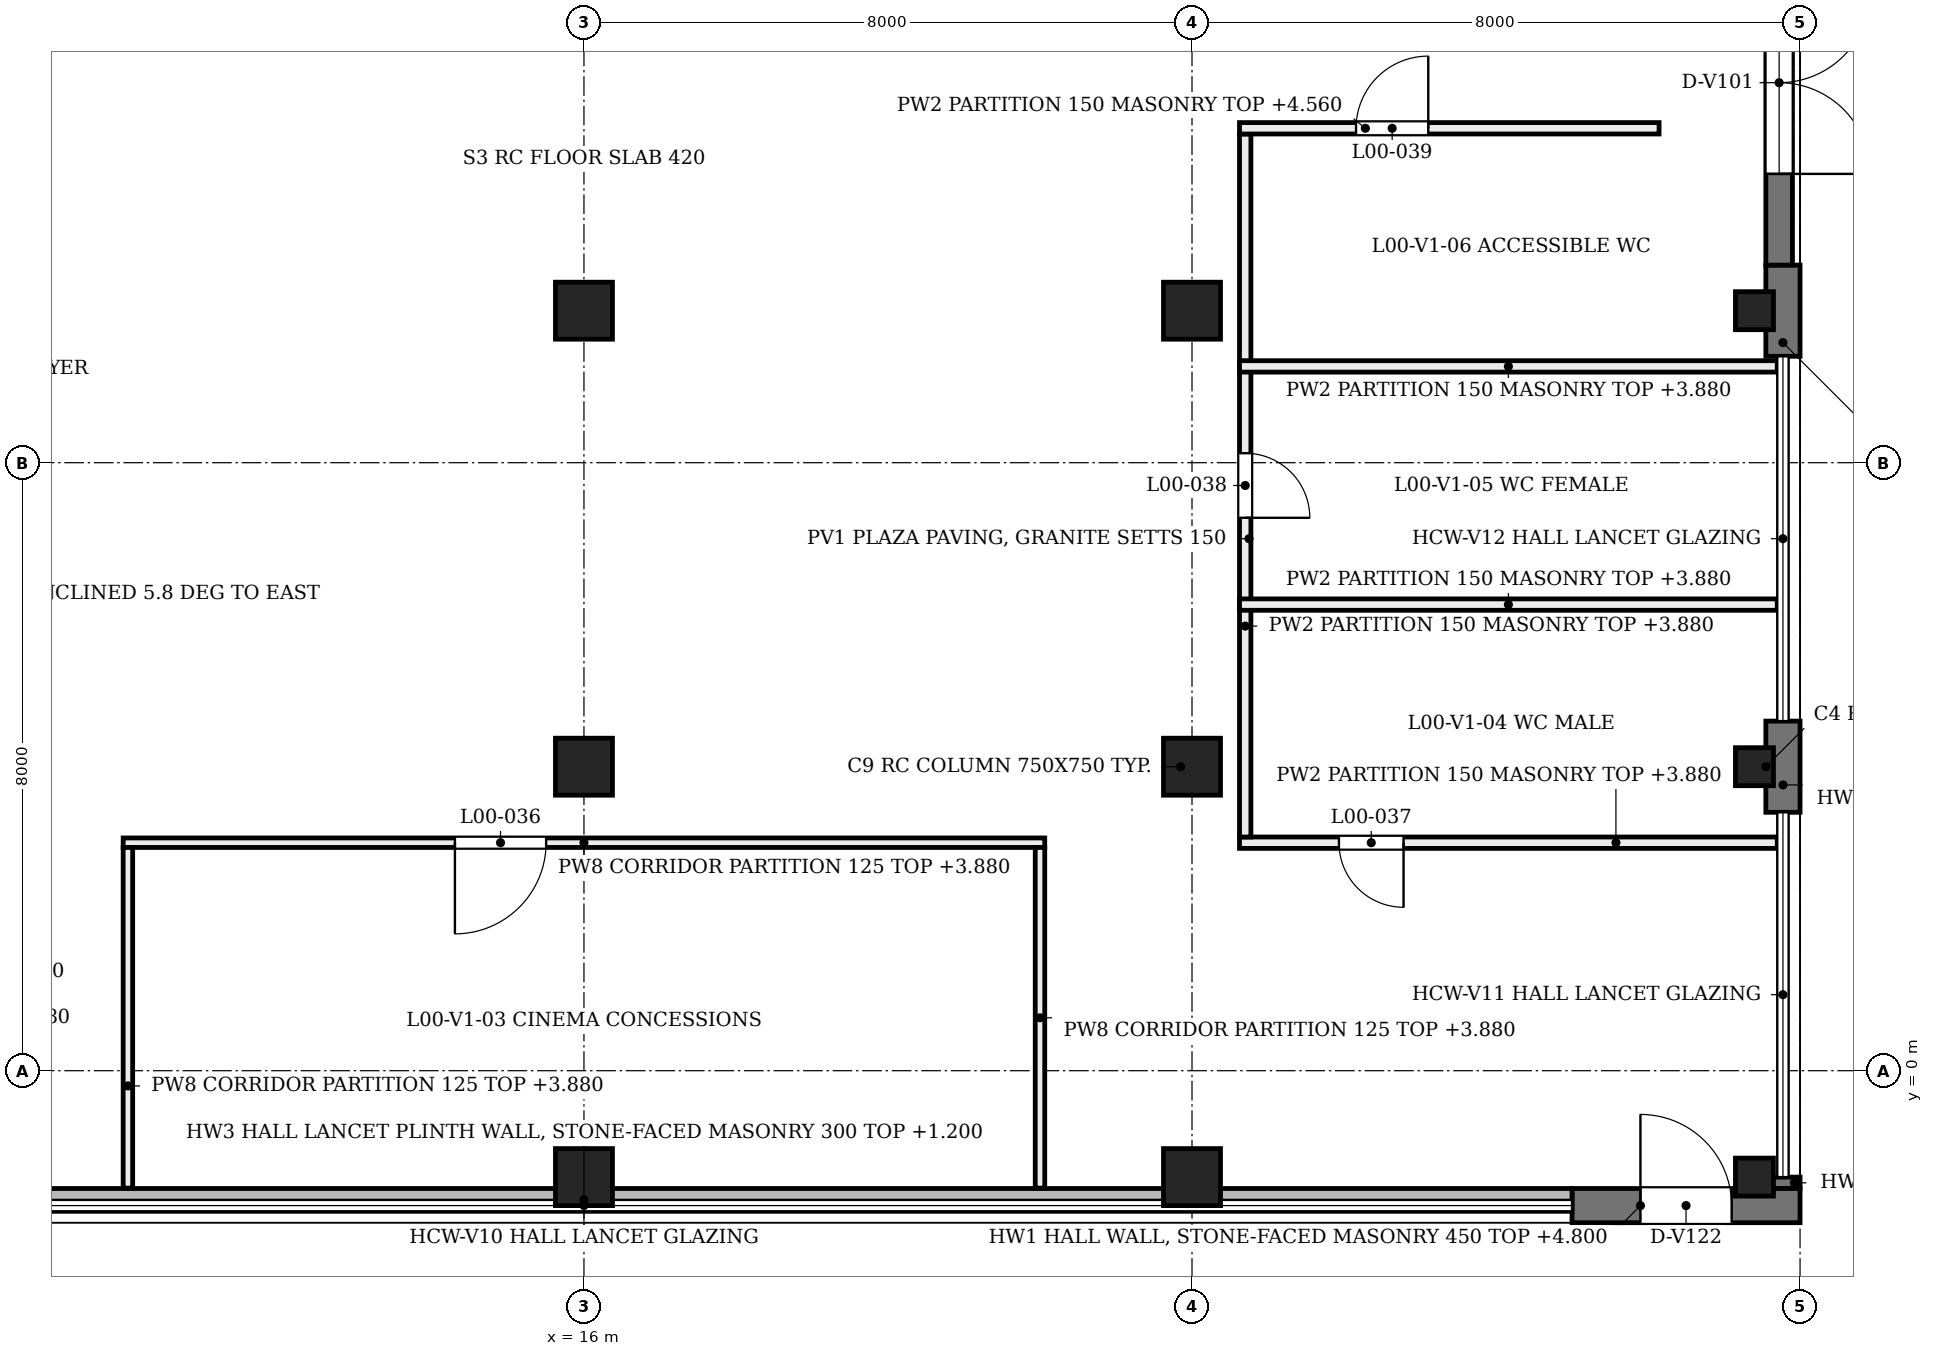
"""IFC4 building model, lengths in metres.
Left out: names, types, materials, properties, quantities, classifications, styles, units other than length and angle.
Written with IfcOpenShell. Run it as: python <this file> out.ifc"""

import sys

from ifc_helpers import new_model, si_unit, direction, frame, frame_2d, origin, origin_2d, place, context, subcontext, project, spatial, rectangle, extrude, element, fill, save


model = new_model("IFC4")
c1 = context("Model", 3, precision=1e-05, world=origin(), true_north=direction((0.0, 1.0)))
c2 = subcontext(c1, "Body", "Model", "MODEL_VIEW")
j1 = project(units=[si_unit("LENGTHUNIT", "METRE"), si_unit("PLANEANGLEUNIT", "RADIAN")], contexts=[c1])
p1 = place(None, origin())
s1 = spatial("IfcSite", under=j1, at=p1, CompositionType="ELEMENT")
p2 = place(p1, origin())
s2 = spatial("IfcBuilding", under=s1, at=p2, CompositionType="ELEMENT")
p3 = place(p2, origin())
s3 = spatial("IfcBuildingStorey", under=s2, at=p3, CompositionType="ELEMENT", Elevation=0.0)
for number, where, z_axis, x_axis in (
    (1, (16.0, -1.4, 0.0), (0.0, 0.0, 1.0), (1.0, 0.0, 0.0)),
    (2, (16.0, 4.0, 0.0), (0.0, 0.0, 1.0), (1.0, 0.0, 0.0)),
    (3, (16.0, 10.0, 0.0), (0.0, 0.0, 1.0), (1.0, 0.0, 0.0)),
    (4, (24.0, -1.4, 0.0), (0.0, 0.0, 1.0), (1.0, 0.0, 0.0)),
    (5, (24.0, 4.0, 0.0), (0.0, 0.0, 1.0), (1.0, 0.0, 0.0)),
    (6, (24.0, 10.0, 0.0), (0.0, 0.0, 1.0), (1.0, 0.0, 0.0)),
):
    element("IfcColumn", number, at=place(p3, frame(where, z_axis=z_axis, x_axis=x_axis)), inside=s3, PredefinedType="COLUMN", context=c2, shape_type="SweptSolid", body=[
        extrude(rectangle(XDim=0.75, YDim=0.75, at=origin_2d()), origin(), (0.0, 0.0, 1.0), 4.8),
    ])
for number, where, z_axis, x_axis in (
    (7, (31.4, -1.4, 0.0), (0.0, 0.0, 1.0), (1.0, 0.0, 0.0)),
    (8, (31.4, 4.0, 0.0), (0.0, 0.0, 1.0), (1.0, 0.0, 0.0)),
    (9, (31.4, 10.0, 0.0), (0.0, 0.0, 1.0), (1.0, 0.0, 0.0)),
):
    element("IfcColumn", number, at=place(p3, frame(where, z_axis=z_axis, x_axis=x_axis)), inside=s3, PredefinedType="COLUMN", context=c2, shape_type="SweptSolid", body=[
        extrude(rectangle(XDim=0.5, YDim=0.5, at=origin_2d()), origin(), (0.0, 0.0, 1.0), 4.8),
    ])
p4 = place(p3, frame((31.775, -1.55, 0.0), z_axis=(0.0, 0.0, 1.0), x_axis=(0.0, 1.0, 0.0)))
e10 = element("IfcWall", 10, at=p4, inside=s3, PredefinedType="SOLIDWALL", context=c2, shape_type="SweptSolid", body=[
    extrude(rectangle(XDim=0.15, YDim=0.45, at=frame_2d((0.075, 0.0))), origin(), (0.0, 0.0, 1.0), 4.8),
])
for number, where, z_axis, x_axis in (
    (11, (31.775, 3.4, 0.0), (0.0, 0.0, 1.0), (0.0, 1.0, 0.0)),
    (12, (31.775, 9.4, 0.0), (0.0, 0.0, 1.0), (0.0, 1.0, 0.0)),
):
    element("IfcWall", number, at=place(p3, frame(where, z_axis=z_axis, x_axis=x_axis)), inside=s3, PredefinedType="SOLIDWALL", context=c2, shape_type="SweptSolid", body=[
        extrude(rectangle(XDim=1.2, YDim=0.45, at=frame_2d((0.6, 0.0))), origin(), (0.0, 0.0, 1.0), 4.8),
    ])
p5 = place(p3, frame((31.725, 10.6, 0.0), z_axis=(0.0, 0.0, 1.0), x_axis=(0.0, 1.0, 0.0)))
e13 = element("IfcWall", 13, at=p5, inside=s3, PredefinedType="SOLIDWALL", context=c2, shape_type="SweptSolid", body=[
    extrude(rectangle(XDim=4.8, YDim=0.35, at=frame_2d((2.4, 0.0))), origin(), (0.0, 0.0, 1.0), 4.8),
])
p6 = place(p5, frame((1.2, 0.0, 0.0)))
e14 = element("IfcOpeningElement", 14, at=p6, cuts=e13, PredefinedType="OPENING", context=c2, shape_type="SweptSolid", body=[
    extrude(rectangle(XDim=2.4, YDim=2.7, at=frame_2d((1.2, 1.35))), frame((0.0, 0.185, 0.0), z_axis=(0.0, -1.0, 0.0), x_axis=(1.0, 0.0, 0.0)), (0.0, 0.0, 1.0), 0.37),
])
p7 = place(p5, frame((1.2, 0.0, 3.0)))
e15 = element("IfcOpeningElement", 15, at=p7, cuts=e13, PredefinedType="OPENING", context=c2, shape_type="SweptSolid", body=[
    extrude(rectangle(XDim=2.4, YDim=1.5, at=frame_2d((1.2, 0.75))), frame((0.0, 0.185, 0.0), z_axis=(0.0, -1.0, 0.0), x_axis=(1.0, 0.0, 0.0)), (0.0, 0.0, 1.0), 0.37),
])
p8 = place(p3, frame((29.0, -1.775, 0.0), z_axis=(0.0, 0.0, 1.0), x_axis=(1.0, 0.0, 0.0)))
e16 = element("IfcWall", 16, at=p8, inside=s3, PredefinedType="SOLIDWALL", context=c2, shape_type="SweptSolid", body=[
    extrude(rectangle(XDim=3.0, YDim=0.45, at=frame_2d((1.5, 0.0))), origin(), (0.0, 0.0, 1.0), 4.8),
])
p9 = place(p8, frame((0.9, 0.0, 0.0)))
e17 = element("IfcOpeningElement", 17, at=p9, cuts=e16, PredefinedType="OPENING", context=c2, shape_type="SweptSolid", body=[
    extrude(rectangle(XDim=1.2, YDim=2.4, at=frame_2d((0.6, 1.2))), frame((0.0, 0.235, 0.0), z_axis=(0.0, -1.0, 0.0), x_axis=(1.0, 0.0, 0.0)), (0.0, 0.0, 1.0), 0.47),
])
p10 = place(p3, frame((3.0, -1.7, 0.0), z_axis=(0.0, 0.0, 1.0), x_axis=(1.0, 0.0, 0.0)))
e18 = element("IfcWall", 18, at=p10, inside=s3, PredefinedType="SOLIDWALL", context=c2, shape_type="SweptSolid", body=[
    extrude(rectangle(XDim=26.0, YDim=0.3, at=frame_2d((13.0, 0.0))), origin(), (0.0, 0.0, 1.0), 1.2),
])
p11 = place(p3, frame((9.938, 3.0, 0.0), z_axis=(0.0, 0.0, 1.0), x_axis=(1.0, 0.0, 0.0)))
e19 = element("IfcWall", 19, at=p11, inside=s3, PredefinedType="PARTITIONING", context=c2, shape_type="SweptSolid", body=[
    extrude(rectangle(XDim=12.125, YDim=0.125, at=frame_2d((6.062, 0.0))), origin(), (0.0, 0.0, 1.0), 3.88),
])
p12 = place(p11, frame((4.365, 0.0, 0.0)))
e20 = element("IfcOpeningElement", 20, at=p12, cuts=e19, PredefinedType="OPENING", context=c2, shape_type="SweptSolid", body=[
    extrude(rectangle(XDim=1.2, YDim=2.2, at=frame_2d((0.6, 1.1))), frame((0.0, 0.073, 0.0), z_axis=(0.0, -1.0, 0.0), x_axis=(1.0, 0.0, 0.0)), (0.0, 0.0, 1.0), 0.145),
])
p13 = place(p3, frame((24.625, 3.0, 0.0), z_axis=(0.0, 0.0, 1.0), x_axis=(1.0, 0.0, 0.0)))
e21 = element("IfcWall", 21, at=p13, inside=s3, PredefinedType="PARTITIONING", context=c2, shape_type="SweptSolid", body=[
    extrude(rectangle(XDim=7.075, YDim=0.15, at=frame_2d((3.538, 0.0))), origin(), (0.0, 0.0, 1.0), 3.88),
])
p14 = place(p13, frame((1.308, 0.0, 0.0)))
e22 = element("IfcOpeningElement", 22, at=p14, cuts=e21, PredefinedType="OPENING", context=c2, shape_type="SweptSolid", body=[
    extrude(rectangle(XDim=0.85, YDim=2.1, at=frame_2d((0.425, 1.05))), frame((0.0, 0.085, 0.0), z_axis=(0.0, -1.0, 0.0), x_axis=(1.0, 0.0, 0.0)), (0.0, 0.0, 1.0), 0.17),
])
p15 = place(p3, frame((24.7, 3.075, 0.0), z_axis=(0.0, 0.0, 1.0), x_axis=(0.0, 1.0, 0.0)))
e23 = element("IfcWall", 23, at=p15, inside=s3, PredefinedType="PARTITIONING", context=c2, shape_type="SweptSolid", body=[
    extrude(rectangle(XDim=9.25, YDim=0.15, at=frame_2d((4.625, 0.0))), origin(), (0.0, 0.0, 1.0), 3.88),
])
p16 = place(p15, frame((4.2, 0.0, 0.0)))
e24 = element("IfcOpeningElement", 24, at=p16, cuts=e23, PredefinedType="OPENING", context=c2, shape_type="SweptSolid", body=[
    extrude(rectangle(XDim=0.85, YDim=2.1, at=frame_2d((0.425, 1.05))), frame((0.0, 0.085, 0.0), z_axis=(0.0, -1.0, 0.0), x_axis=(1.0, 0.0, 0.0)), (0.0, 0.0, 1.0), 0.17),
])
p17 = place(p3, frame((24.625, 12.4, 0.0), z_axis=(0.0, 0.0, 1.0), x_axis=(1.0, 0.0, 0.0)))
e25 = element("IfcWall", 25, at=p17, inside=s3, PredefinedType="PARTITIONING", context=c2, shape_type="SweptSolid", body=[
    extrude(rectangle(XDim=5.52, YDim=0.15, at=frame_2d((2.76, 0.0))), origin(), (0.0, 0.0, 1.0), 4.56),
])
p18 = place(p17, frame((1.533, 0.0, 0.0)))
e26 = element("IfcOpeningElement", 26, at=p18, cuts=e25, PredefinedType="OPENING", context=c2, shape_type="SweptSolid", body=[
    extrude(rectangle(XDim=0.95, YDim=2.1, at=frame_2d((0.475, 1.05))), frame((0.0, 0.085, 0.0), z_axis=(0.0, -1.0, 0.0), x_axis=(1.0, 0.0, 0.0)), (0.0, 0.0, 1.0), 0.17),
])
for number, where, z_axis, x_axis in (
    (27, (10.0, -1.545, 0.0), (0.0, 0.0, 1.0), (0.0, 1.0, 0.0)),
    (28, (22.0, -1.545, 0.0), (0.0, 0.0, 1.0), (0.0, 1.0, 0.0)),
):
    element("IfcWall", number, at=place(p3, frame(where, z_axis=z_axis, x_axis=x_axis)), inside=s3, PredefinedType="PARTITIONING", context=c2, shape_type="SweptSolid", body=[
        extrude(rectangle(XDim=4.482, YDim=0.125, at=frame_2d((2.241, 0.0))), origin(), (0.0, 0.0, 1.0), 3.88),
    ])
for number, where, z_axis, x_axis in (
    (29, (24.625, 6.133, 0.0), (0.0, 0.0, 1.0), (1.0, 0.0, 0.0)),
    (30, (24.625, 9.267, 0.0), (0.0, 0.0, 1.0), (1.0, 0.0, 0.0)),
):
    element("IfcWall", number, at=place(p3, frame(where, z_axis=z_axis, x_axis=x_axis)), inside=s3, PredefinedType="PARTITIONING", context=c2, shape_type="SweptSolid", body=[
        extrude(rectangle(XDim=7.075, YDim=0.15, at=frame_2d((3.538, 0.0))), origin(), (0.0, 0.0, 1.0), 3.88),
    ])
p19 = place(p6, frame((2.4, 0.0, 0.0), z_axis=(0.0, 0.0, 1.0), x_axis=(-1.0, 0.0, 0.0)))
e31 = element("IfcDoor", 31, at=p19, inside=s3, OperationType="SINGLE_SWING_LEFT", PredefinedType="DOOR", context=c2, shape_type="SweptSolid", body=[
    extrude(rectangle(XDim=2.4, YDim=2.7, at=frame_2d((1.2, 1.35))), frame((0.0, 0.025, 0.0), z_axis=(0.0, -1.0, 0.0), x_axis=(1.0, 0.0, 0.0)), (0.0, 0.0, 1.0), 0.05),
])
fill(e14, e31)
p20 = place(p7, origin())
e32 = element("IfcWindow", 32, at=p20, inside=s3, PartitioningType="SINGLE_PANEL", PredefinedType="WINDOW", context=c2, shape_type="SweptSolid", body=[
    extrude(rectangle(XDim=2.4, YDim=1.5, at=frame_2d((1.2, 0.75))), frame((0.0, 0.03, 0.0), z_axis=(0.0, -1.0, 0.0), x_axis=(1.0, 0.0, 0.0)), (0.0, 0.0, 1.0), 0.06),
])
fill(e15, e32)
p21 = place(p9, origin())
e33 = element("IfcDoor", 33, at=p21, inside=s3, OperationType="SINGLE_SWING_LEFT", PredefinedType="DOOR", context=c2, shape_type="SweptSolid", body=[
    extrude(rectangle(XDim=1.2, YDim=2.4, at=frame_2d((0.6, 1.2))), frame((0.0, 0.025, 0.0), z_axis=(0.0, -1.0, 0.0), x_axis=(1.0, 0.0, 0.0)), (0.0, 0.0, 1.0), 0.05),
])
fill(e17, e33)
p22 = place(p12, frame((1.2, 0.0, 0.0), z_axis=(0.0, 0.0, 1.0), x_axis=(-1.0, 0.0, 0.0)))
e34 = element("IfcDoor", 34, at=p22, inside=s3, OperationType="SINGLE_SWING_LEFT", PredefinedType="DOOR", context=c2, shape_type="SweptSolid", body=[
    extrude(rectangle(XDim=1.2, YDim=2.2, at=frame_2d((0.6, 1.1))), frame((0.0, 0.025, 0.0), z_axis=(0.0, -1.0, 0.0), x_axis=(1.0, 0.0, 0.0)), (0.0, 0.0, 1.0), 0.05),
])
fill(e20, e34)
p23 = place(p14, origin())
e35 = element("IfcDoor", 35, at=p23, inside=s3, OperationType="SINGLE_SWING_RIGHT", PredefinedType="DOOR", context=c2, shape_type="SweptSolid", body=[
    extrude(rectangle(XDim=0.85, YDim=2.1, at=frame_2d((0.425, 1.05))), frame((0.0, 0.025, 0.0), z_axis=(0.0, -1.0, 0.0), x_axis=(1.0, 0.0, 0.0)), (0.0, 0.0, 1.0), 0.05),
])
fill(e22, e35)
p24 = place(p16, frame((0.85, 0.0, 0.0), z_axis=(0.0, 0.0, 1.0), x_axis=(-1.0, 0.0, 0.0)))
e36 = element("IfcDoor", 36, at=p24, inside=s3, OperationType="SINGLE_SWING_LEFT", PredefinedType="DOOR", context=c2, shape_type="SweptSolid", body=[
    extrude(rectangle(XDim=0.85, YDim=2.1, at=frame_2d((0.425, 1.05))), frame((0.0, 0.025, 0.0), z_axis=(0.0, -1.0, 0.0), x_axis=(1.0, 0.0, 0.0)), (0.0, 0.0, 1.0), 0.05),
])
fill(e24, e36)
p25 = place(p18, frame((0.95, 0.0, 0.0), z_axis=(0.0, 0.0, 1.0), x_axis=(-1.0, 0.0, 0.0)))
e37 = element("IfcDoor", 37, at=p25, inside=s3, OperationType="SINGLE_SWING_RIGHT", PredefinedType="DOOR", context=c2, shape_type="SweptSolid", body=[
    extrude(rectangle(XDim=0.95, YDim=2.1, at=frame_2d((0.475, 1.05))), frame((0.0, 0.025, 0.0), z_axis=(0.0, -1.0, 0.0), x_axis=(1.0, 0.0, 0.0)), (0.0, 0.0, 1.0), 0.05),
])
fill(e26, e37)
save(model, sys.argv[1])
